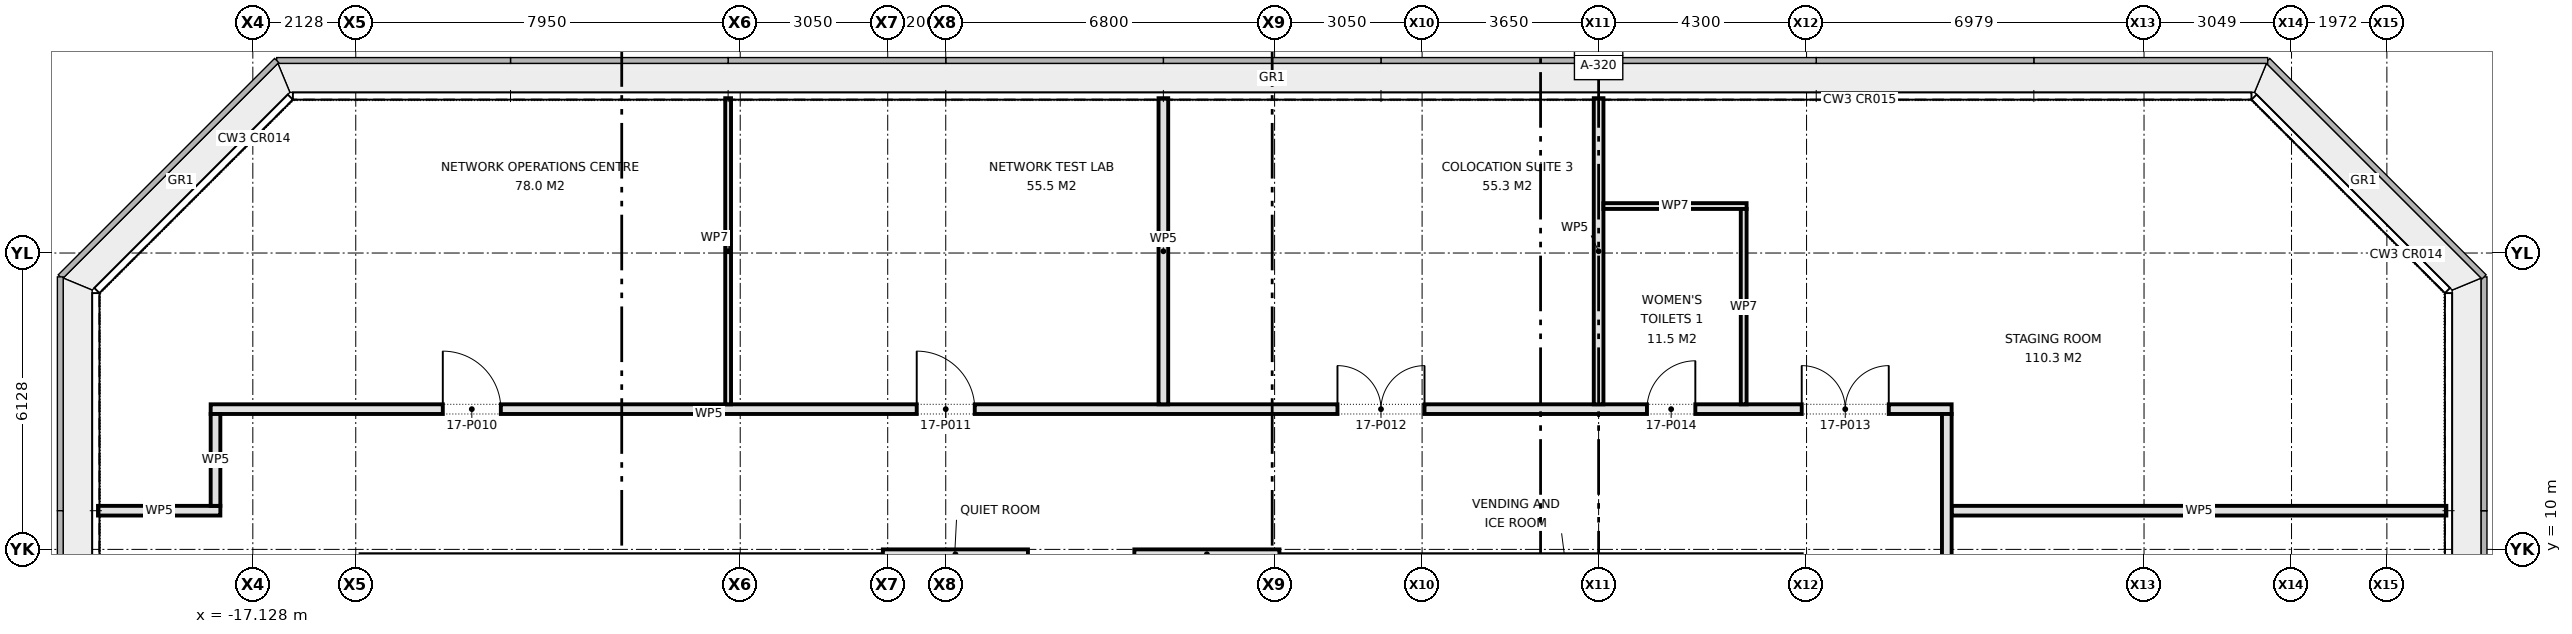
"""IFC4 building model, lengths in metres.
Left out: names, types, materials, properties, quantities, classifications, styles, units other than length and angle.
Written with IfcOpenShell. Run it as: python <this file> out.ifc"""

import sys

from ifc_helpers import new_model, si_unit, direction, frame, frame_2d, origin, place, context, subcontext, project, spatial, rectangle, extrude, element, fill, save


model = new_model("IFC4")
c1 = context("Model", 3, precision=1e-05, world=origin(), true_north=direction((0.0, 1.0)))
c2 = subcontext(c1, "Body", "Model", "MODEL_VIEW")
j1 = project(units=[si_unit("LENGTHUNIT", "METRE"), si_unit("PLANEANGLEUNIT", "RADIAN")], contexts=[c1])
p1 = place(None, origin())
s1 = spatial("IfcSite", under=j1, at=p1, CompositionType="ELEMENT")
p2 = place(p1, origin())
s2 = spatial("IfcBuilding", under=s1, at=p2, CompositionType="ELEMENT")
p3 = place(p2, frame((0.0, 0.0, 77.6)))
s3 = spatial("IfcBuildingStorey", under=s2, at=p3, CompositionType="ELEMENT", Elevation=77.6)
for number, where, z_axis, x_axis in (
    (1, (-4.1, 9.9, 0.0), (0.0, 0.0, 1.0), (1.0, 0.0, 0.0)),
    (2, (1.1, 9.9, 0.0), (0.0, 0.0, 1.0), (1.0, 0.0, 0.0)),
):
    element("IfcWall", number, at=place(p3, frame(where, z_axis=z_axis, x_axis=x_axis)), inside=s3, PredefinedType="PARTITIONING", context=c2, shape_type="SweptSolid", body=[
        extrude(rectangle(XDim=3.0, YDim=0.2, at=frame_2d((1.5, 0.0))), origin(), (0.0, 0.0, 1.0), 3.263),
    ])
p4 = place(p3, frame((-20.33, 10.8, 0.0), z_axis=(0.0, 0.0, 1.0), x_axis=(1.0, 0.0, 0.0)))
e3 = element("IfcWall", 3, at=p4, inside=s3, PredefinedType="PARTITIONING", context=c2, shape_type="SweptSolid", body=[
    extrude(rectangle(XDim=2.53, YDim=0.2, at=frame_2d((1.265, 0.0))), origin(), (0.0, 0.0, 1.0), 4.2),
])
p5 = place(p3, frame((18.0, 10.8, 0.0), z_axis=(0.0, 0.0, 1.0), x_axis=(1.0, 0.0, 0.0)))
e4 = element("IfcWall", 4, at=p5, inside=s3, PredefinedType="PARTITIONING", context=c2, shape_type="SweptSolid", body=[
    extrude(rectangle(XDim=10.23, YDim=0.2, at=frame_2d((5.115, 0.0))), origin(), (0.0, 0.0, 1.0), 4.2),
])
p6 = place(p3, frame((-18.0, 12.9, 0.0), z_axis=(0.0, 0.0, 1.0), x_axis=(1.0, 0.0, 0.0)))
e5 = element("IfcWall", 5, at=p6, inside=s3, PredefinedType="PARTITIONING", context=c2, shape_type="SweptSolid", body=[
    extrude(rectangle(XDim=36.0, YDim=0.2, at=frame_2d((18.0, 0.0))), origin(), (0.0, 0.0, 1.0), 4.2),
])
p7 = place(p6, frame((4.8, 0.0, 0.0)))
e6 = element("IfcOpeningElement", 6, at=p7, cuts=e5, PredefinedType="OPENING", context=c2, shape_type="SweptSolid", body=[
    extrude(rectangle(XDim=1.2, YDim=2.1, at=frame_2d((0.6, 1.05))), frame((0.0, 0.11, 0.0), z_axis=(0.0, -1.0, 0.0), x_axis=(1.0, 0.0, 0.0)), (0.0, 0.0, 1.0), 0.22),
])
p8 = place(p6, frame((14.6, 0.0, 0.0)))
e7 = element("IfcOpeningElement", 7, at=p8, cuts=e5, PredefinedType="OPENING", context=c2, shape_type="SweptSolid", body=[
    extrude(rectangle(XDim=1.2, YDim=2.1, at=frame_2d((0.6, 1.05))), frame((0.0, 0.11, 0.0), z_axis=(0.0, -1.0, 0.0), x_axis=(1.0, 0.0, 0.0)), (0.0, 0.0, 1.0), 0.22),
])
p9 = place(p6, frame((23.3, 0.0, 0.0)))
e8 = element("IfcOpeningElement", 8, at=p9, cuts=e5, PredefinedType="OPENING", context=c2, shape_type="SweptSolid", body=[
    extrude(rectangle(XDim=1.8, YDim=2.1, at=frame_2d((0.9, 1.05))), frame((0.0, 0.11, 0.0), z_axis=(0.0, -1.0, 0.0), x_axis=(1.0, 0.0, 0.0)), (0.0, 0.0, 1.0), 0.22),
])
p10 = place(p6, frame((32.9, 0.0, 0.0)))
e9 = element("IfcOpeningElement", 9, at=p10, cuts=e5, PredefinedType="OPENING", context=c2, shape_type="SweptSolid", body=[
    extrude(rectangle(XDim=1.8, YDim=2.1, at=frame_2d((0.9, 1.05))), frame((0.0, 0.11, 0.0), z_axis=(0.0, -1.0, 0.0), x_axis=(1.0, 0.0, 0.0)), (0.0, 0.0, 1.0), 0.22),
])
p11 = place(p6, frame((29.7, 0.0, 0.0)))
e10 = element("IfcOpeningElement", 10, at=p11, cuts=e5, PredefinedType="OPENING", context=c2, shape_type="SweptSolid", body=[
    extrude(rectangle(XDim=1.0, YDim=2.1, at=frame_2d((0.5, 1.05))), frame((0.0, 0.11, 0.0), z_axis=(0.0, -1.0, 0.0), x_axis=(1.0, 0.0, 0.0)), (0.0, 0.0, 1.0), 0.22),
])
p12 = place(p3, frame((17.9, -12.8, 0.0), z_axis=(0.0, 0.0, 1.0), x_axis=(0.0, 1.0, 0.0)))
e11 = element("IfcWall", 11, at=p12, inside=s3, PredefinedType="PARTITIONING", context=c2, shape_type="SweptSolid", body=[
    extrude(rectangle(XDim=25.6, YDim=0.2, at=frame_2d((12.8, 0.0))), origin(), (0.0, 0.0, 1.0), 4.2),
])
p13 = place(p12, frame((4.4, 0.0, 0.0)))
e12 = element("IfcOpeningElement", 12, at=p13, cuts=e11, PredefinedType="OPENING", context=c2, shape_type="SweptSolid", body=[
    extrude(rectangle(XDim=1.2, YDim=2.1, at=frame_2d((0.6, 1.05))), frame((0.0, 0.11, 0.0), z_axis=(0.0, -1.0, 0.0), x_axis=(1.0, 0.0, 0.0)), (0.0, 0.0, 1.0), 0.22),
])
p14 = place(p12, frame((15.95, 0.0, 0.0)))
e13 = element("IfcOpeningElement", 13, at=p14, cuts=e11, PredefinedType="OPENING", context=c2, shape_type="SweptSolid", body=[
    extrude(rectangle(XDim=1.8, YDim=2.1, at=frame_2d((0.9, 1.05))), frame((0.0, 0.11, 0.0), z_axis=(0.0, -1.0, 0.0), x_axis=(1.0, 0.0, 0.0)), (0.0, 0.0, 1.0), 0.22),
])
for number, where, z_axis, x_axis in (
    (14, (10.7, 13.0, 0.0), (0.0, 0.0, 1.0), (0.0, 1.0, 0.0)),
    (15, (1.7, 13.0, 0.0), (0.0, 0.0, 1.0), (0.0, 1.0, 0.0)),
):
    element("IfcWall", number, at=place(p3, frame(where, z_axis=z_axis, x_axis=x_axis)), inside=s3, PredefinedType="PARTITIONING", context=c2, shape_type="SweptSolid", body=[
        extrude(rectangle(XDim=6.33, YDim=0.2, at=frame_2d((3.165, 0.0))), origin(), (0.0, 0.0, 1.0), 4.2),
    ])
p15 = place(p3, frame((-17.9, 10.9, 0.0), z_axis=(0.0, 0.0, 1.0), x_axis=(0.0, 1.0, 0.0)))
e16 = element("IfcWall", 16, at=p15, inside=s3, PredefinedType="PARTITIONING", context=c2, shape_type="SweptSolid", body=[
    extrude(rectangle(XDim=1.9, YDim=0.2, at=frame_2d((0.95, 0.0))), origin(), (0.0, 0.0, 1.0), 4.2),
])
p16 = place(p3, frame((10.8, 17.1, 0.0), z_axis=(0.0, 0.0, 1.0), x_axis=(1.0, 0.0, 0.0)))
e17 = element("IfcWall", 17, at=p16, inside=s3, PredefinedType="PARTITIONING", context=c2, shape_type="SweptSolid", body=[
    extrude(rectangle(XDim=2.96, YDim=0.12, at=frame_2d((1.48, 0.0))), origin(), (0.0, 0.0, 1.0), 4.2),
])
p17 = place(p3, frame((13.7, 13.0, 0.0), z_axis=(0.0, 0.0, 1.0), x_axis=(0.0, 1.0, 0.0)))
e18 = element("IfcWall", 18, at=p17, inside=s3, PredefinedType="PARTITIONING", context=c2, shape_type="SweptSolid", body=[
    extrude(rectangle(XDim=4.04, YDim=0.12, at=frame_2d((2.02, 0.0))), origin(), (0.0, 0.0, 1.0), 4.2),
])
p18 = place(p3, frame((-7.3, 13.0, 0.0), z_axis=(0.0, 0.0, 1.0), x_axis=(0.0, 1.0, 0.0)))
e19 = element("IfcWall", 19, at=p18, inside=s3, PredefinedType="PARTITIONING", context=c2, shape_type="SweptSolid", body=[
    extrude(rectangle(XDim=6.33, YDim=0.12, at=frame_2d((3.165, 0.0))), origin(), (0.0, 0.0, 1.0), 4.2),
])
p19 = place(p7, origin())
e20 = element("IfcDoor", 20, at=p19, inside=s3, OperationType="SINGLE_SWING_LEFT", PredefinedType="DOOR", context=c2, shape_type="SweptSolid", body=[
    extrude(rectangle(XDim=1.2, YDim=2.1, at=frame_2d((0.6, 1.05))), frame((0.0, 0.025, 0.0), z_axis=(0.0, -1.0, 0.0), x_axis=(1.0, 0.0, 0.0)), (0.0, 0.0, 1.0), 0.05),
])
fill(e6, e20)
p20 = place(p8, origin())
e21 = element("IfcDoor", 21, at=p20, inside=s3, OperationType="SINGLE_SWING_LEFT", PredefinedType="DOOR", context=c2, shape_type="SweptSolid", body=[
    extrude(rectangle(XDim=1.2, YDim=2.1, at=frame_2d((0.6, 1.05))), frame((0.0, 0.025, 0.0), z_axis=(0.0, -1.0, 0.0), x_axis=(1.0, 0.0, 0.0)), (0.0, 0.0, 1.0), 0.05),
])
fill(e7, e21)
p21 = place(p9, origin())
e22 = element("IfcDoor", 22, at=p21, inside=s3, OperationType="DOUBLE_DOOR_SINGLE_SWING", PredefinedType="DOOR", context=c2, shape_type="SweptSolid", body=[
    extrude(rectangle(XDim=1.8, YDim=2.1, at=frame_2d((0.9, 1.05))), frame((0.0, 0.025, 0.0), z_axis=(0.0, -1.0, 0.0), x_axis=(1.0, 0.0, 0.0)), (0.0, 0.0, 1.0), 0.05),
])
fill(e8, e22)
p22 = place(p10, origin())
e23 = element("IfcDoor", 23, at=p22, inside=s3, OperationType="DOUBLE_DOOR_SINGLE_SWING", PredefinedType="DOOR", context=c2, shape_type="SweptSolid", body=[
    extrude(rectangle(XDim=1.8, YDim=2.1, at=frame_2d((0.9, 1.05))), frame((0.0, 0.025, 0.0), z_axis=(0.0, -1.0, 0.0), x_axis=(1.0, 0.0, 0.0)), (0.0, 0.0, 1.0), 0.05),
])
fill(e9, e23)
p23 = place(p11, origin())
e24 = element("IfcDoor", 24, at=p23, inside=s3, OperationType="SINGLE_SWING_RIGHT", PredefinedType="DOOR", context=c2, shape_type="SweptSolid", body=[
    extrude(rectangle(XDim=1.0, YDim=2.1, at=frame_2d((0.5, 1.05))), frame((0.0, 0.025, 0.0), z_axis=(0.0, -1.0, 0.0), x_axis=(1.0, 0.0, 0.0)), (0.0, 0.0, 1.0), 0.05),
])
fill(e10, e24)
save(model, sys.argv[1])
